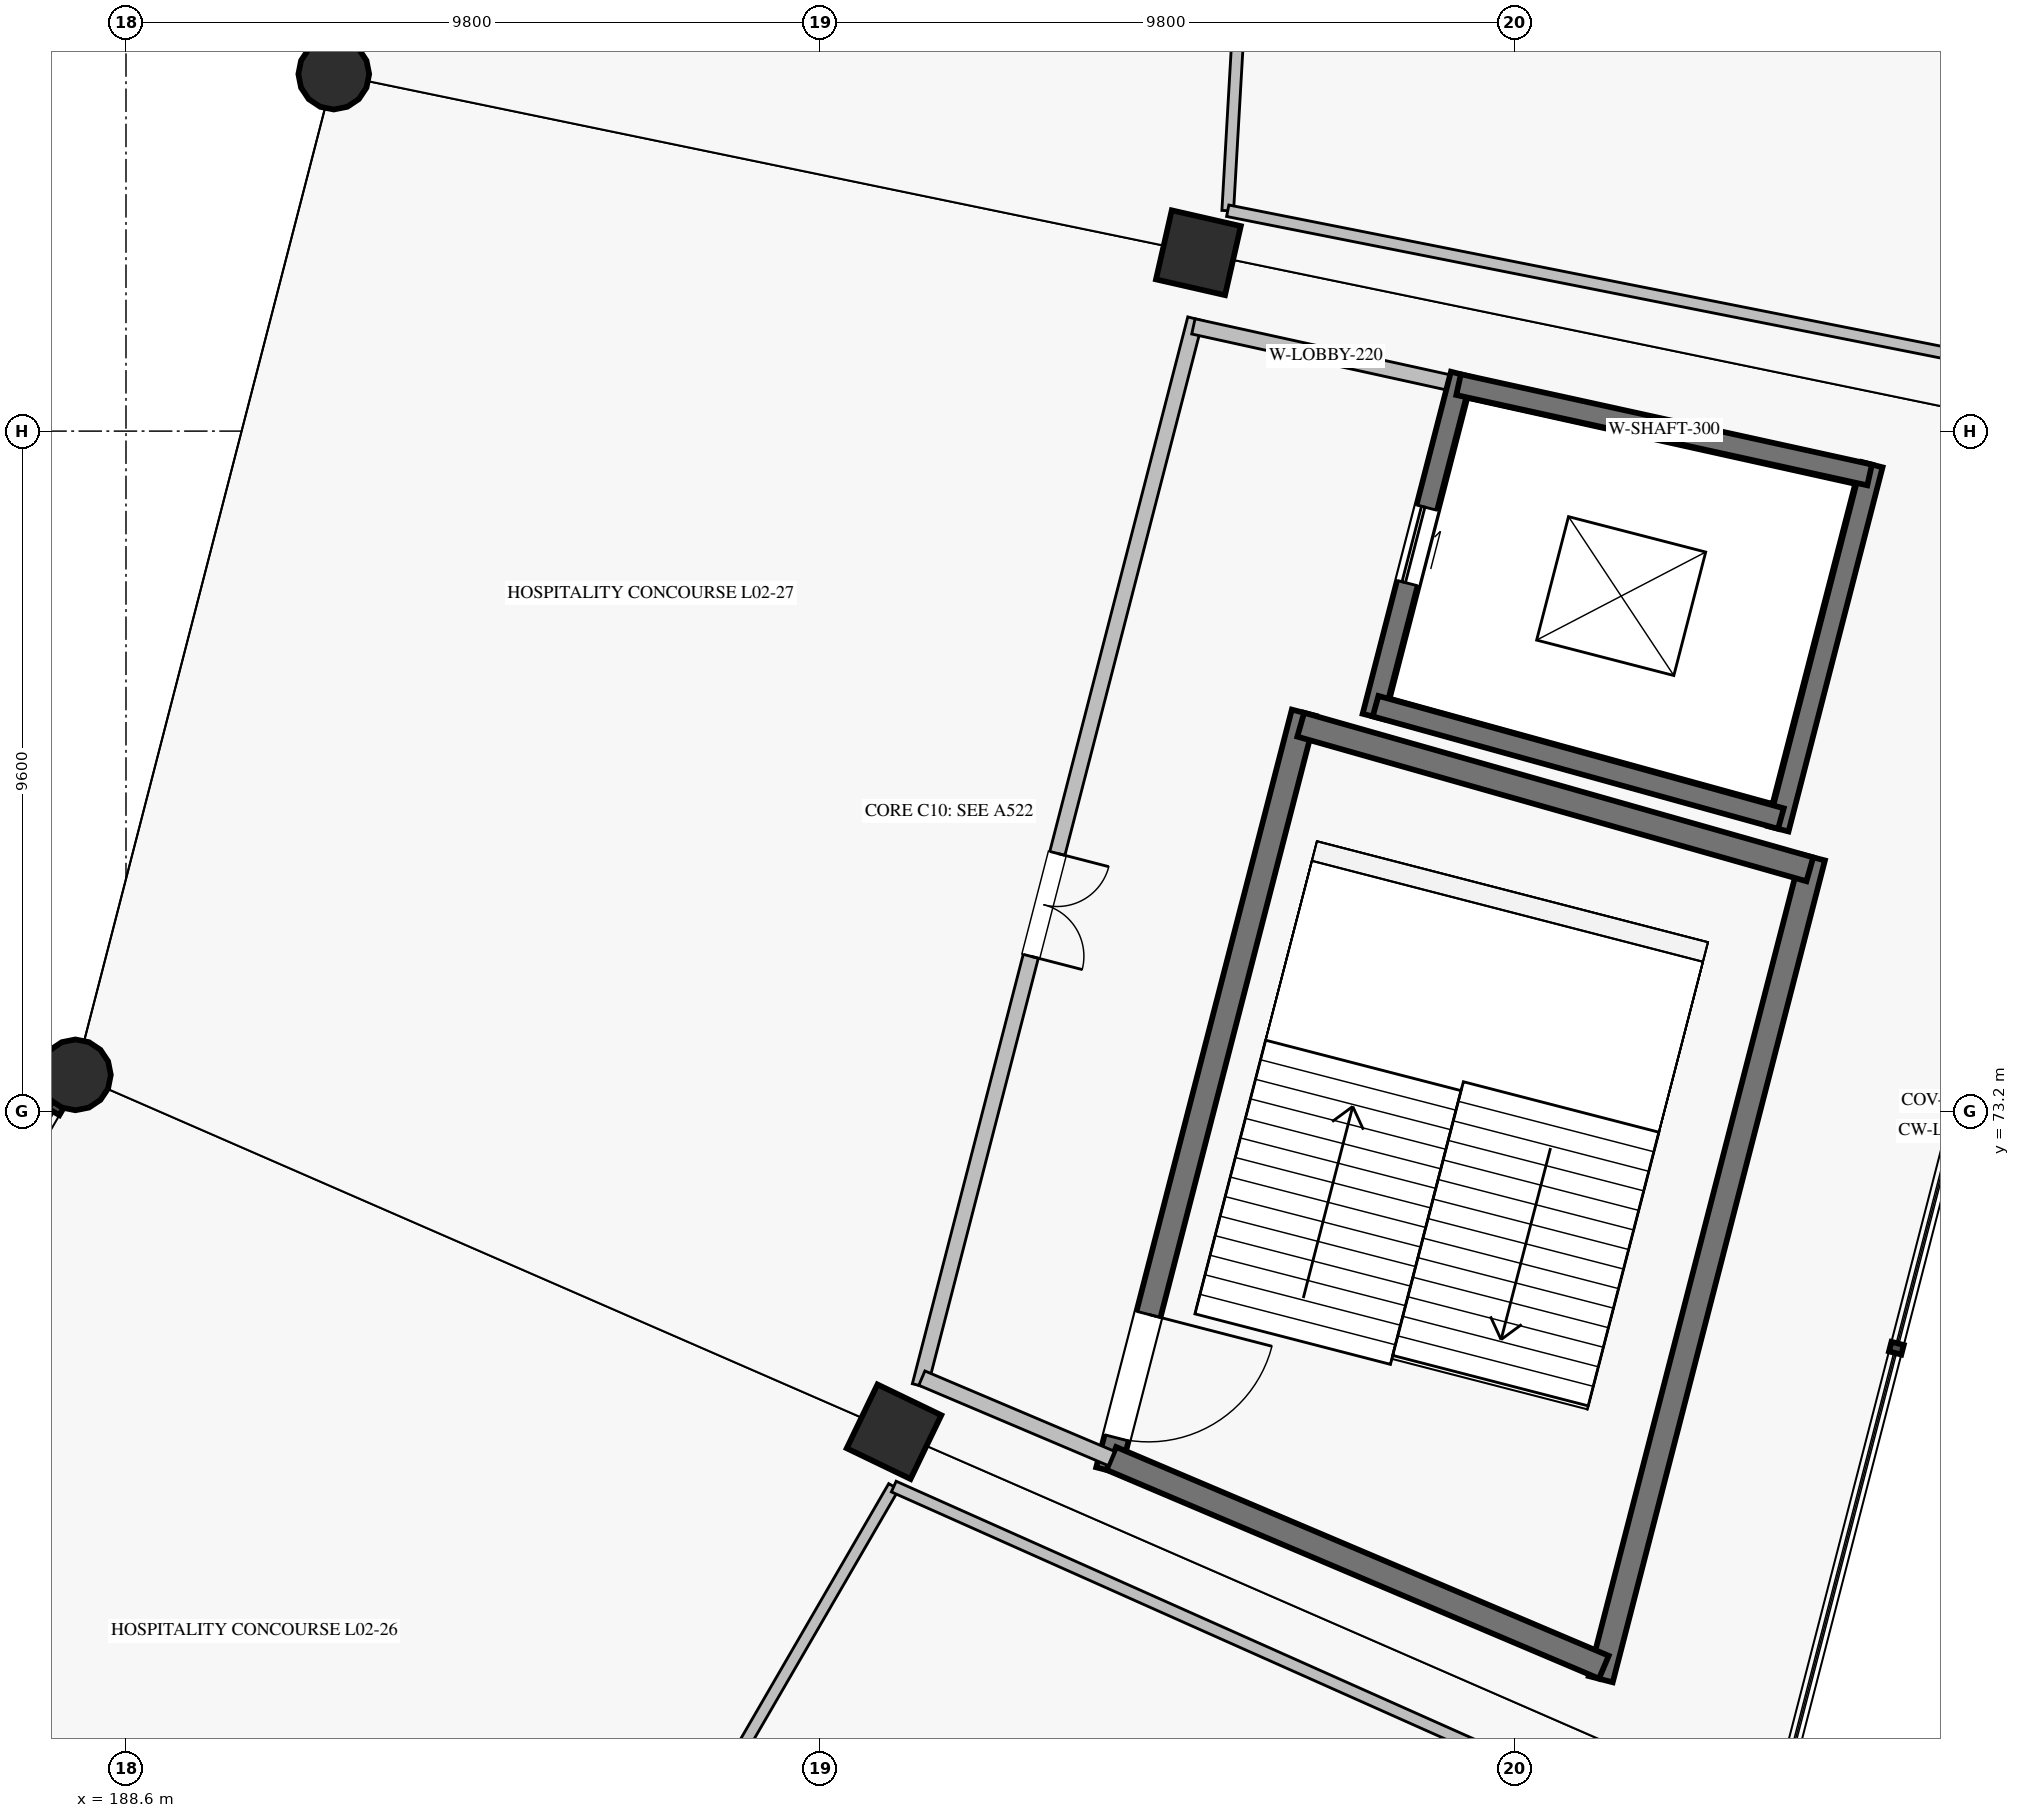
"""IFC4 building model, lengths in metres.
Left out: names, types, materials, properties, quantities, classifications, styles, units other than length and angle.
Written with IfcOpenShell. Run it as: python <this file> out.ifc"""

import sys

from ifc_helpers import new_model, si_unit, direction, frame, frame_2d, origin, origin_2d, place, context, subcontext, project, spatial, rectangle, circle, extrude, element, fill, save


model = new_model("IFC4")
c1 = context("Model", 3, precision=1e-05, world=origin(), true_north=direction((0.0, 1.0)))
c2 = subcontext(c1, "Body", "Model", "MODEL_VIEW")
j1 = project(units=[si_unit("LENGTHUNIT", "METRE"), si_unit("PLANEANGLEUNIT", "RADIAN")], contexts=[c1])
p1 = place(None, origin())
s1 = spatial("IfcSite", under=j1, at=p1, CompositionType="ELEMENT")
p2 = place(p1, origin())
s2 = spatial("IfcBuilding", under=s1, at=p2, CompositionType="ELEMENT")
p3 = place(p2, frame((0.0, 0.0, 10.54)))
s3 = spatial("IfcBuildingStorey", under=s2, at=p3, CompositionType="ELEMENT", Elevation=10.54)
for number, where, z_axis, x_axis in (
    (1, (187.886, 73.713, 0.0), (0.0, 0.0, 1.0), (0.901, -0.434, 0.0)),
    (2, (191.533, 87.84, 0.0), (0.0, 0.0, 1.0), (0.975, -0.223, 0.0)),
):
    element("IfcColumn", number, at=place(p3, frame(where, z_axis=z_axis, x_axis=x_axis)), inside=s3, PredefinedType="COLUMN", context=c2, shape_type="SweptSolid", body=[
        extrude(circle(Radius=0.5, at=origin_2d()), origin(), (0.0, 0.0, 1.0), 5.1),
    ])
for number, where, z_axis, x_axis in (
    (3, (199.441, 68.675, 0.0), (0.0, 0.0, 1.0), (0.901, -0.434, 0.0)),
    (4, (203.738, 85.318, 0.0), (0.0, 0.0, 1.0), (0.975, -0.223, 0.0)),
):
    element("IfcColumn", number, at=place(p3, frame(where, z_axis=z_axis, x_axis=x_axis)), inside=s3, PredefinedType="COLUMN", context=c2, shape_type="SweptSolid", body=[
        extrude(rectangle(XDim=1.0, YDim=1.0, at=origin_2d()), origin(), (0.0, 0.0, 1.0), 5.1),
    ])
p4 = place(p3, frame((202.464, 68.129, 0.0), z_axis=(0.0, 0.0, 1.0), x_axis=(0.249959564539, 0.968256276042, 0.0)))
e5 = element("IfcWall", 5, at=p4, inside=s3, PredefinedType="SHEAR", context=c2, shape_type="SweptSolid", body=[
    extrude(rectangle(XDim=11.047, YDim=0.35, at=frame_2d((5.523, 0.0))), origin(), (0.0, 0.0, 1.0), 4.84),
])
p5 = place(p4, frame((0.475, 0.0, 0.0)))
e6 = element("IfcOpeningElement", 6, at=p5, cuts=e5, PredefinedType="OPENING", context=c2, shape_type="SweptSolid", body=[
    extrude(rectangle(XDim=1.8, YDim=2.2, at=frame_2d((0.9, 1.1))), frame((0.0, 0.185, 0.0), z_axis=(0.0, -1.0, 0.0), x_axis=(1.0, 0.0, 0.0)), (0.0, 0.0, 1.0), 0.37),
])
p6 = place(p3, frame((209.417, 65.182, 0.0), z_axis=(0.0, 0.0, 1.0), x_axis=(0.249969221583, 0.968253782983, 0.0)))
e7 = element("IfcWall", 7, at=p6, inside=s3, PredefinedType="SHEAR", context=c2, shape_type="SweptSolid", body=[
    extrude(rectangle(XDim=11.982, YDim=0.35, at=frame_2d((5.991, 0.0))), origin(), (0.0, 0.0, 1.0), 4.84),
])
p7 = place(p3, frame((202.508, 68.299, 0.0), z_axis=(0.0, 0.0, 1.0), x_axis=(0.920704667209, -0.390260061728, 0.0)))
e8 = element("IfcWall", 8, at=p7, inside=s3, PredefinedType="SHEAR", context=c2, shape_type="SweptSolid", body=[
    extrude(rectangle(XDim=7.552, YDim=0.35, at=frame_2d((3.776, 0.0))), origin(), (0.0, 0.0, 1.0), 4.84),
])
p8 = place(p3, frame((205.182, 78.656, 0.0), z_axis=(0.0, 0.0, 1.0), x_axis=(0.961945802461, -0.273240321195, 0.0)))
e9 = element("IfcWall", 9, at=p8, inside=s3, PredefinedType="SHEAR", context=c2, shape_type="SweptSolid", body=[
    extrude(rectangle(XDim=7.47, YDim=0.35, at=frame_2d((3.735, 0.0))), origin(), (0.0, 0.0, 1.0), 4.84),
])
p9 = place(p3, frame((206.201, 78.772, 0.0), z_axis=(0.0, 0.0, 1.0), x_axis=(0.249946120621, 0.968259746549, 0.0)))
e10 = element("IfcWall", 10, at=p9, inside=s3, PredefinedType="SHEAR", context=c2, shape_type="SweptSolid", body=[
    extrude(rectangle(XDim=4.987, YDim=0.3, at=frame_2d((2.494, 0.0))), origin(), (0.0, 0.0, 1.0), 4.84),
])
p10 = place(p9, frame((1.944, 0.0, 0.0)))
e11 = element("IfcOpeningElement", 11, at=p10, cuts=e10, PredefinedType="OPENING", context=c2, shape_type="SweptSolid", body=[
    extrude(rectangle(XDim=1.1, YDim=2.2, at=frame_2d((0.55, 1.1))), frame((0.0, 0.16, 0.0), z_axis=(0.0, -1.0, 0.0), x_axis=(1.0, 0.0, 0.0)), (0.0, 0.0, 1.0), 0.32),
])
p11 = place(p3, frame((211.923, 77.186, 0.0), z_axis=(0.0, 0.0, 1.0), x_axis=(0.249918349381, 0.968266914979, 0.0)))
e12 = element("IfcWall", 12, at=p11, inside=s3, PredefinedType="SHEAR", context=c2, shape_type="SweptSolid", body=[
    extrude(rectangle(XDim=5.309, YDim=0.3, at=frame_2d((2.655, 0.0))), origin(), (0.0, 0.0, 1.0), 4.84),
])
p12 = place(p3, frame((206.239, 78.917, 0.0), z_axis=(0.0, 0.0, 1.0), x_axis=(0.963642107639, -0.267196348002, 0.0)))
e13 = element("IfcWall", 13, at=p12, inside=s3, PredefinedType="SHEAR", context=c2, shape_type="SweptSolid", body=[
    extrude(rectangle(XDim=5.937, YDim=0.3, at=frame_2d((2.969, 0.0))), origin(), (0.0, 0.0, 1.0), 4.84),
])
p13 = place(p3, frame((207.41, 83.456, 0.0), z_axis=(0.0, 0.0, 1.0), x_axis=(0.976707381947, -0.214575604509, 0.0)))
e14 = element("IfcWall", 14, at=p13, inside=s3, PredefinedType="SHEAR", context=c2, shape_type="SweptSolid", body=[
    extrude(rectangle(XDim=5.94, YDim=0.3, at=frame_2d((2.97, 0.0))), origin(), (0.0, 0.0, 1.0), 4.84),
])
p14 = place(p3, frame((199.807, 69.325, 0.0), z_axis=(0.0, 0.0, 1.0), x_axis=(0.249963472505, 0.968255267176, 0.0)))
e15 = element("IfcWall", 15, at=p14, inside=s3, PredefinedType="SOLIDWALL", context=c2, shape_type="SweptSolid", body=[
    extrude(rectangle(XDim=15.553, YDim=0.22, at=frame_2d((7.776, 0.0))), origin(), (0.0, 0.0, 1.0), 3.788),
])
p15 = place(p14, frame((6.26, 0.0, 0.0)))
e16 = element("IfcOpeningElement", 16, at=p15, cuts=e15, PredefinedType="OPENING", context=c2, shape_type="SweptSolid", body=[
    extrude(rectangle(XDim=1.5, YDim=2.2, at=frame_2d((0.75, 1.1))), frame((0.0, 0.12, 0.0), z_axis=(0.0, -1.0, 0.0), x_axis=(1.0, 0.0, 0.0)), (0.0, 0.0, 1.0), 0.24),
])
p16 = place(p3, frame((199.834, 69.432, 0.0), z_axis=(0.0, 0.0, 1.0), x_axis=(0.920711790761, -0.390243255361, 0.0)))
e17 = element("IfcWall", 17, at=p16, inside=s3, PredefinedType="SOLIDWALL", context=c2, shape_type="SweptSolid", body=[
    extrude(rectangle(XDim=2.904, YDim=0.22, at=frame_2d((1.452, 0.0))), origin(), (0.0, 0.0, 1.0), 4.84),
])
p17 = place(p3, frame((203.667, 84.278, 0.0), z_axis=(0.0, 0.0, 1.0), x_axis=(0.976714725209, -0.214542176645, 0.0)))
e18 = element("IfcWall", 18, at=p17, inside=s3, PredefinedType="SOLIDWALL", context=c2, shape_type="SweptSolid", body=[
    extrude(rectangle(XDim=3.833, YDim=0.22, at=frame_2d((1.917, 0.0))), origin(), (0.0, 0.0, 1.0), 4.84),
])
p18 = place(p3, frame((191.179, 53.658, 0.0), z_axis=(0.0, 0.0, 1.0), x_axis=(0.501617777052, 0.865089362867, 0.0)))
e19 = element("IfcWall", 19, at=p18, inside=s3, PredefinedType="PARTITIONING", context=c2, shape_type="SweptSolid", body=[
    extrude(rectangle(XDim=16.464, YDim=0.165, at=frame_2d((8.232, 0.0))), origin(), (0.0, 0.0, 1.0), 4.16),
])
p19 = place(p18, frame((7.357, 0.0, 0.0)))
e20 = element("IfcOpeningElement", 20, at=p19, cuts=e19, PredefinedType="OPENING", context=c2, shape_type="SweptSolid", body=[
    extrude(rectangle(XDim=1.75, YDim=2.3, at=frame_2d((0.875, 1.15))), frame((0.0, 0.093, 0.0), z_axis=(0.0, -1.0, 0.0), x_axis=(1.0, 0.0, 0.0)), (0.0, 0.0, 1.0), 0.185),
])
p20 = place(p3, frame((199.438, 67.901, 0.0), z_axis=(0.0, 0.0, 1.0), x_axis=(0.913245562849, -0.407409550621, 0.0)))
e21 = element("IfcWall", 21, at=p20, inside=s3, PredefinedType="PARTITIONING", context=c2, shape_type="SweptSolid", body=[
    extrude(rectangle(XDim=12.4, YDim=0.165, at=frame_2d((6.2, 0.0))), origin(), (0.0, 0.0, 1.0), 4.16),
])
p21 = place(p3, frame((204.152, 85.911, 0.0), z_axis=(0.0, 0.0, 1.0), x_axis=(0.057603503798, 0.998339539611, 0.0)))
e22 = element("IfcWall", 22, at=p21, inside=s3, PredefinedType="PARTITIONING", context=c2, shape_type="SweptSolid", body=[
    extrude(rectangle(XDim=15.444, YDim=0.165, at=frame_2d((7.722, 0.0))), origin(), (0.0, 0.0, 1.0), 4.16),
])
p22 = place(p21, frame((7.212, 0.0, 0.0)))
e23 = element("IfcOpeningElement", 23, at=p22, cuts=e22, PredefinedType="OPENING", context=c2, shape_type="SweptSolid", body=[
    extrude(rectangle(XDim=1.02, YDim=2.1, at=frame_2d((0.51, 1.05))), frame((0.0, 0.093, 0.0), z_axis=(0.0, -1.0, 0.0), x_axis=(1.0, 0.0, 0.0)), (0.0, 0.0, 1.0), 0.185),
])
p23 = place(p3, frame((204.152, 85.911, 0.0), z_axis=(0.0, 0.0, 1.0), x_axis=(0.980904167784, -0.194491680088, 0.0)))
e24 = element("IfcWall", 24, at=p23, inside=s3, PredefinedType="PARTITIONING", context=c2, shape_type="SweptSolid", body=[
    extrude(rectangle(XDim=12.257, YDim=0.165, at=frame_2d((6.128, 0.0))), origin(), (0.0, 0.0, 1.0), 4.16),
])
p24 = place(p5, frame((1.8, 0.0, 0.0), z_axis=(0.0, 0.0, 1.0), x_axis=(-1.0, 0.0, 0.0)))
e25 = element("IfcDoor", 25, at=p24, inside=s3, OperationType="SINGLE_SWING_LEFT", PredefinedType="DOOR", context=c2, shape_type="SweptSolid", body=[
    extrude(rectangle(XDim=1.8, YDim=2.2, at=frame_2d((0.9, 1.1))), frame((0.0, 0.025, 0.0), z_axis=(0.0, -1.0, 0.0), x_axis=(1.0, 0.0, 0.0)), (0.0, 0.0, 1.0), 0.05),
])
fill(e6, e25)
p25 = place(p10, origin())
e26 = element("IfcDoor", 26, at=p25, inside=s3, OperationType="SLIDING_TO_RIGHT", PredefinedType="DOOR", context=c2, shape_type="SweptSolid", body=[
    extrude(rectangle(XDim=1.1, YDim=2.2, at=frame_2d((0.55, 1.1))), frame((0.0, 0.025, 0.0), z_axis=(0.0, -1.0, 0.0), x_axis=(1.0, 0.0, 0.0)), (0.0, 0.0, 1.0), 0.05),
])
fill(e11, e26)
p26 = place(p15, frame((1.5, 0.0, 0.0), z_axis=(0.0, 0.0, 1.0), x_axis=(-1.0, 0.0, 0.0)))
e27 = element("IfcDoor", 27, at=p26, inside=s3, OperationType="DOUBLE_DOOR_SINGLE_SWING", PredefinedType="DOOR", context=c2, shape_type="SweptSolid", body=[
    extrude(rectangle(XDim=1.5, YDim=2.2, at=frame_2d((0.75, 1.1))), frame((0.0, 0.025, 0.0), z_axis=(0.0, -1.0, 0.0), x_axis=(1.0, 0.0, 0.0)), (0.0, 0.0, 1.0), 0.05),
])
fill(e16, e27)
save(model, sys.argv[1])
